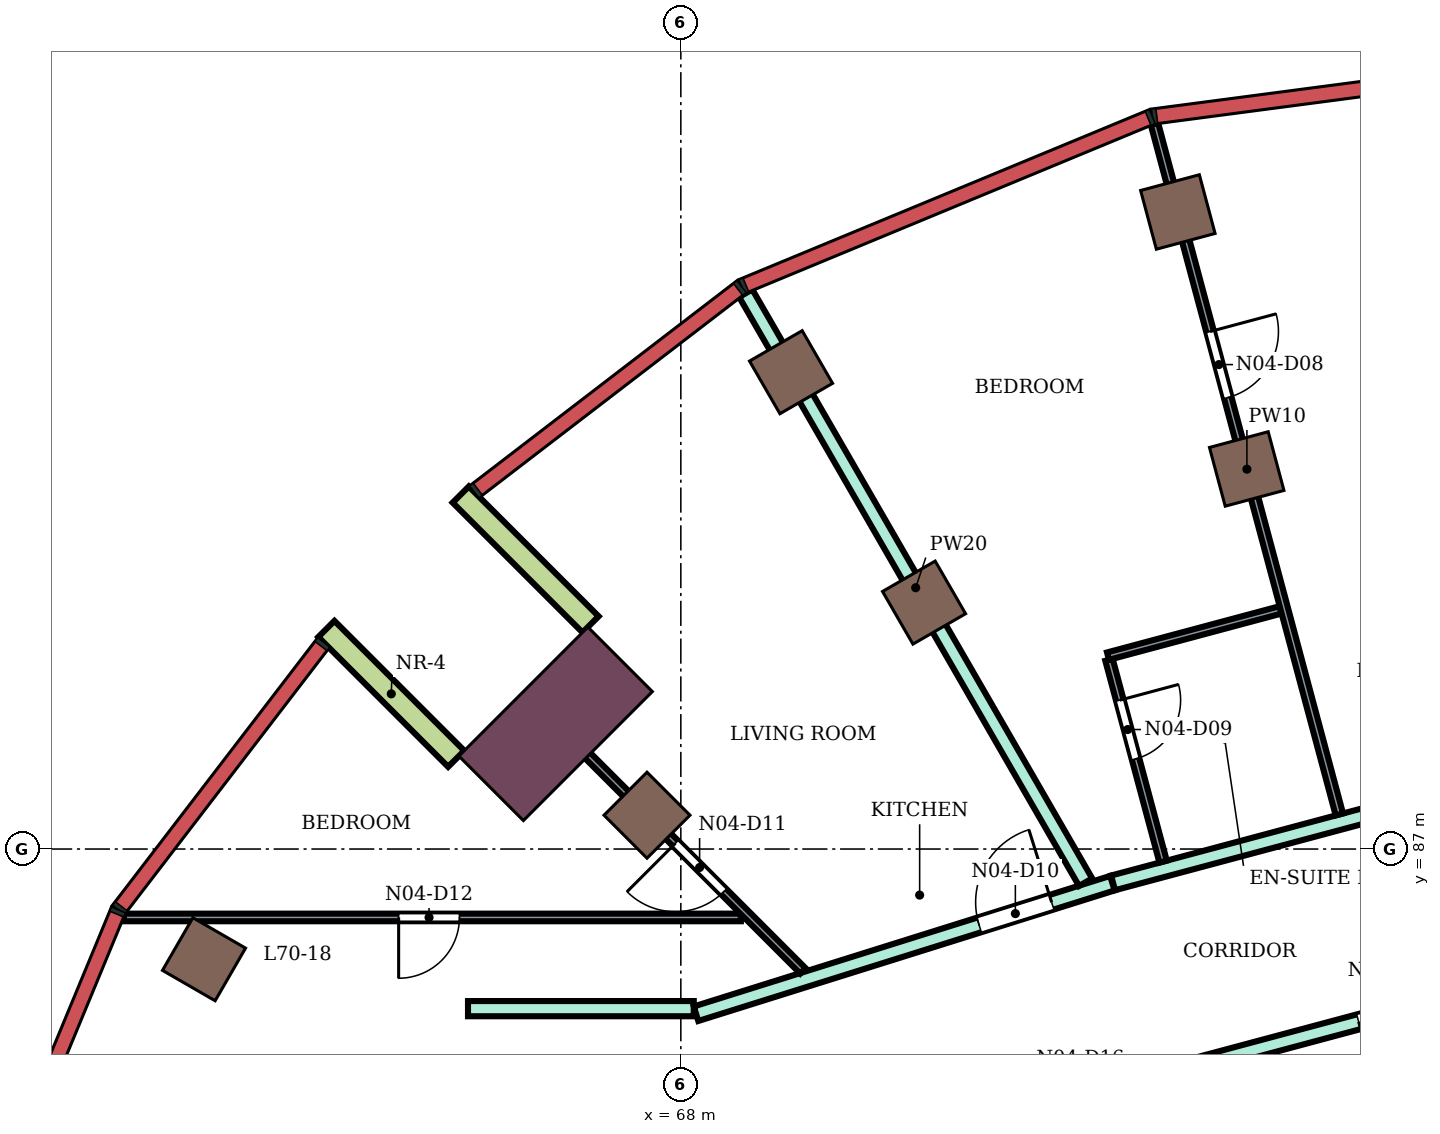
"""IFC4 building model, lengths in metres.
Left out: names, types, materials, properties, quantities, classifications, styles, units other than length and angle.
Written with IfcOpenShell. Run it as: python <this file> out.ifc"""

import sys

from ifc_helpers import new_model, si_unit, direction, frame, frame_2d, origin, origin_2d, place, context, subcontext, project, spatial, rectangle, extrude, element, fill, save


model = new_model("IFC4")
c1 = context("Model", 3, precision=1e-05, world=origin(), true_north=direction((0.0, 1.0)))
c2 = subcontext(c1, "Body", "Model", "MODEL_VIEW")
j1 = project(units=[si_unit("LENGTHUNIT", "METRE"), si_unit("PLANEANGLEUNIT", "RADIAN")], contexts=[c1])
p1 = place(None, origin())
s1 = spatial("IfcSite", under=j1, at=p1, CompositionType="ELEMENT")
p2 = place(p1, origin())
s2 = spatial("IfcBuilding", under=s1, at=p2, CompositionType="ELEMENT")
p3 = place(p2, frame((0.0, 0.0, 305.1)))
s3 = spatial("IfcBuildingStorey", under=s2, at=p3, CompositionType="ELEMENT", Elevation=305.1)
for number, where, z_axis, x_axis in (
    (1, (74.539, 95.381, 0.0), (0.0, 0.0, 1.0), (-0.259, 0.966, 0.0)),
    (2, (69.45, 93.273, 0.0), (0.0, 0.0, 1.0), (-0.5, 0.866, 0.0)),
    (3, (61.727, 85.55, 0.0), (0.0, 0.0, 1.0), (-0.866, 0.5, 0.0)),
    (4, (75.445, 92.0, 0.0), (0.0, 0.0, 1.0), (-0.259, 0.966, 0.0)),
    (5, (71.2, 90.242, 0.0), (0.0, 0.0, 1.0), (-0.5, 0.866, 0.0)),
    (6, (67.555, 87.445, 0.0), (0.0, 0.0, 1.0), (-0.707, 0.707, 0.0)),
):
    element("IfcColumn", number, at=place(p3, frame(where, z_axis=z_axis, x_axis=x_axis)), inside=s3, PredefinedType="COLUMN", context=c2, shape_type="SweptSolid", body=[
        extrude(rectangle(XDim=0.8, YDim=0.8, at=origin_2d()), origin(), (0.0, 0.0, 1.0), 4.2),
    ])
p4 = place(p3, frame((66.353, 88.647, 0.0), z_axis=(0.0, 0.0, 1.0), x_axis=(-0.707106781187, 0.707106781187, 0.0)))
e7 = element("IfcColumn", 7, at=p4, inside=s3, PredefinedType="COLUMN", context=c2, shape_type="SweptSolid", body=[
    extrude(rectangle(XDim=1.2, YDim=2.4, at=origin_2d()), origin(), (0.0, 0.0, 1.0), 4.2),
])
for number, where, z_axis, x_axis in (
    (8, (66.812, 89.955, 0.0), (0.0, 0.0, 1.0), (-0.707, 0.707, 0.0)),
    (9, (65.045, 88.188, 0.0), (0.0, 0.0, 1.0), (-0.707, 0.707, 0.0)),
):
    element("IfcWall", number, at=place(p3, frame(where, z_axis=z_axis, x_axis=x_axis)), inside=s3, PredefinedType="NOTDEFINED", context=c2, shape_type="SweptSolid", body=[
        extrude(rectangle(XDim=2.416, YDim=0.3, at=frame_2d((1.208, 0.0))), origin(), (0.0, 0.0, 1.0), 4.2),
    ])
p5 = place(p3, frame((65.2, 84.9, 0.0), z_axis=(0.0, 0.0, 1.0), x_axis=(1.0, 0.0, 0.0)))
e10 = element("IfcWall", 10, at=p5, inside=s3, PredefinedType="PARTITIONING", context=c2, shape_type="SweptSolid", body=[
    extrude(rectangle(XDim=2.97, YDim=0.2, at=frame_2d((1.485, 0.0))), origin(), (0.0, 0.0, 1.0), 3.75),
])
p6 = place(p3, frame((68.2, 84.833, 0.0), z_axis=(0.0, 0.0, 1.0), x_axis=(0.954191968402, 0.299195065863, 0.0)))
e11 = element("IfcWall", 11, at=p6, inside=s3, PredefinedType="PARTITIONING", context=c2, shape_type="SweptSolid", body=[
    extrude(rectangle(XDim=5.74, YDim=0.2, at=frame_2d((2.87, 0.0))), origin(), (0.0, 0.0, 1.0), 3.75),
])
p7 = place(p6, frame((3.903, 0.0, 0.0)))
e12 = element("IfcOpeningElement", 12, at=p7, cuts=e11, PredefinedType="OPENING", context=c2, shape_type="SweptSolid", body=[
    extrude(rectangle(XDim=1.0, YDim=2.1, at=frame_2d((0.5, 1.05))), frame((0.0, 0.11, 0.0), z_axis=(0.0, -1.0, 0.0), x_axis=(1.0, 0.0, 0.0)), (0.0, 0.0, 1.0), 0.22),
])
p8 = place(p3, frame((68.854, 94.312, 0.0), z_axis=(0.0, 0.0, 1.0), x_axis=(0.499901994742, -0.866081979753, 0.0)))
e13 = element("IfcWall", 13, at=p8, inside=s3, PredefinedType="PARTITIONING", context=c2, shape_type="SweptSolid", body=[
    extrude(rectangle(XDim=8.946, YDim=0.2, at=frame_2d((4.473, 0.0))), origin(), (0.0, 0.0, 1.0), 3.75),
])
p9 = place(p3, frame((73.687, 86.555, 0.0), z_axis=(0.0, 0.0, 1.0), x_axis=(0.966020868517, 0.258464081818, 0.0)))
e14 = element("IfcWall", 14, at=p9, inside=s3, PredefinedType="PARTITIONING", context=c2, shape_type="SweptSolid", body=[
    extrude(rectangle(XDim=6.446, YDim=0.2, at=frame_2d((3.223, 0.0))), origin(), (0.0, 0.0, 1.0), 3.75),
])
p10 = place(p9, frame((5.362, 0.0, 0.0)))
e15 = element("IfcOpeningElement", 15, at=p10, cuts=e14, PredefinedType="OPENING", context=c2, shape_type="SweptSolid", body=[
    extrude(rectangle(XDim=1.0, YDim=2.1, at=frame_2d((0.5, 1.05))), frame((0.0, 0.11, 0.0), z_axis=(0.0, -1.0, 0.0), x_axis=(1.0, 0.0, 0.0)), (0.0, 0.0, 1.0), 0.22),
])
p11 = place(p3, frame((74.413, 84.057, 0.0), z_axis=(0.0, 0.0, 1.0), x_axis=(0.965972135939, 0.258646153246, 0.0)))
e16 = element("IfcWall", 16, at=p11, inside=s3, PredefinedType="PARTITIONING", context=c2, shape_type="SweptSolid", body=[
    extrude(rectangle(XDim=5.654, YDim=0.2, at=frame_2d((2.827, 0.0))), origin(), (0.0, 0.0, 1.0), 3.75),
])
p12 = place(p11, frame((2.593, 0.0, 0.0)))
e17 = element("IfcOpeningElement", 17, at=p12, cuts=e16, PredefinedType="OPENING", context=c2, shape_type="SweptSolid", body=[
    extrude(rectangle(XDim=0.9, YDim=2.1, at=frame_2d((0.45, 1.05))), frame((0.0, 0.11, 0.0), z_axis=(0.0, -1.0, 0.0), x_axis=(1.0, 0.0, 0.0)), (0.0, 0.0, 1.0), 0.22),
])
p13 = place(p3, frame((60.673, 86.1, 0.0), z_axis=(0.0, 0.0, 1.0), x_axis=(1.0, 0.0, 0.0)))
e18 = element("IfcWall", 18, at=p13, inside=s3, PredefinedType="PARTITIONING", context=c2, shape_type="SweptSolid", body=[
    extrude(rectangle(XDim=8.117, YDim=0.1, at=frame_2d((4.059, 0.0))), origin(), (0.0, 0.0, 1.0), 3.75),
])
p14 = place(p13, frame((3.615, 0.0, 0.0)))
e19 = element("IfcOpeningElement", 19, at=p14, cuts=e18, PredefinedType="OPENING", context=c2, shape_type="SweptSolid", body=[
    extrude(rectangle(XDim=0.8, YDim=2.1, at=frame_2d((0.4, 1.05))), frame((0.0, 0.06, 0.0), z_axis=(0.0, -1.0, 0.0), x_axis=(1.0, 0.0, 0.0)), (0.0, 0.0, 1.0), 0.12),
])
p15 = place(p3, frame((66.073, 88.932, 0.0), z_axis=(0.0, 0.0, 1.0), x_axis=(0.70696025587, -0.707253276147, 0.0)))
e20 = element("IfcWall", 20, at=p15, inside=s3, PredefinedType="PARTITIONING", context=c2, shape_type="SweptSolid", body=[
    extrude(rectangle(XDim=4.999, YDim=0.1, at=frame_2d((2.5, 0.0))), origin(), (0.0, 0.0, 1.0), 3.75),
])
p16 = place(p15, frame((2.626, 0.0, 0.0)))
e21 = element("IfcOpeningElement", 21, at=p16, cuts=e20, PredefinedType="OPENING", context=c2, shape_type="SweptSolid", body=[
    extrude(rectangle(XDim=0.9, YDim=2.1, at=frame_2d((0.45, 1.05))), frame((0.0, 0.06, 0.0), z_axis=(0.0, -1.0, 0.0), x_axis=(1.0, 0.0, 0.0)), (0.0, 0.0, 1.0), 0.12),
])
p17 = place(p3, frame((73.633, 89.49, 0.0), z_axis=(0.0, 0.0, 1.0), x_axis=(0.259005329799, -0.965875892201, 0.0)))
e22 = element("IfcWall", 22, at=p17, inside=s3, PredefinedType="PARTITIONING", context=c2, shape_type="SweptSolid", body=[
    extrude(rectangle(XDim=2.75, YDim=0.1, at=frame_2d((1.375, 0.0))), origin(), (0.0, 0.0, 1.0), 3.75),
])
p18 = place(p17, frame((0.55, 0.0, 0.0)))
e23 = element("IfcOpeningElement", 23, at=p18, cuts=e22, PredefinedType="OPENING", context=c2, shape_type="SweptSolid", body=[
    extrude(rectangle(XDim=0.8, YDim=2.1, at=frame_2d((0.4, 1.05))), frame((0.0, 0.06, 0.0), z_axis=(0.0, -1.0, 0.0), x_axis=(1.0, 0.0, 0.0)), (0.0, 0.0, 1.0), 0.12),
])
p19 = place(p3, frame((73.62, 89.538, 0.0), z_axis=(0.0, 0.0, 1.0), x_axis=(0.965948051503, 0.258736085224, 0.0)))
e24 = element("IfcWall", 24, at=p19, inside=s3, PredefinedType="PARTITIONING", context=c2, shape_type="SweptSolid", body=[
    extrude(rectangle(XDim=2.35, YDim=0.1, at=frame_2d((1.175, 0.0))), origin(), (0.0, 0.0, 1.0), 3.75),
])
p20 = place(p3, frame((74.231, 96.539, 0.0), z_axis=(0.0, 0.0, 1.0), x_axis=(0.258666006211, -0.965966819943, 0.0)))
e25 = element("IfcWall", 25, at=p20, inside=s3, PredefinedType="PARTITIONING", context=c2, shape_type="SweptSolid", body=[
    extrude(rectangle(XDim=9.404, YDim=0.1, at=frame_2d((4.702, 0.0))), origin(), (0.0, 0.0, 1.0), 3.75),
])
p21 = place(p20, frame((2.827, 0.0, 0.0)))
e26 = element("IfcOpeningElement", 26, at=p21, cuts=e25, PredefinedType="OPENING", context=c2, shape_type="SweptSolid", body=[
    extrude(rectangle(XDim=0.9, YDim=2.1, at=frame_2d((0.45, 1.05))), frame((0.0, 0.06, 0.0), z_axis=(0.0, -1.0, 0.0), x_axis=(1.0, 0.0, 0.0)), (0.0, 0.0, 1.0), 0.12),
])
p22 = place(p21, origin())
e27 = element("IfcDoor", 27, at=p22, inside=s3, OperationType="SINGLE_SWING_LEFT", PredefinedType="DOOR", context=c2, shape_type="SweptSolid", body=[
    extrude(rectangle(XDim=0.9, YDim=2.1, at=frame_2d((0.45, 1.05))), frame((0.0, 0.025, 0.0), z_axis=(0.0, -1.0, 0.0), x_axis=(1.0, 0.0, 0.0)), (0.0, 0.0, 1.0), 0.05),
])
fill(e26, e27)
p23 = place(p18, origin())
e28 = element("IfcDoor", 28, at=p23, inside=s3, OperationType="SINGLE_SWING_LEFT", PredefinedType="DOOR", context=c2, shape_type="SweptSolid", body=[
    extrude(rectangle(XDim=0.8, YDim=2.1, at=frame_2d((0.4, 1.05))), frame((0.0, 0.025, 0.0), z_axis=(0.0, -1.0, 0.0), x_axis=(1.0, 0.0, 0.0)), (0.0, 0.0, 1.0), 0.05),
])
fill(e23, e28)
p24 = place(p7, origin())
e29 = element("IfcDoor", 29, at=p24, inside=s3, OperationType="SINGLE_SWING_RIGHT", PredefinedType="DOOR", context=c2, shape_type="SweptSolid", body=[
    extrude(rectangle(XDim=1.0, YDim=2.1, at=frame_2d((0.5, 1.05))), frame((0.0, 0.025, 0.0), z_axis=(0.0, -1.0, 0.0), x_axis=(1.0, 0.0, 0.0)), (0.0, 0.0, 1.0), 0.05),
])
fill(e12, e29)
p25 = place(p16, frame((0.9, 0.0, 0.0), z_axis=(0.0, 0.0, 1.0), x_axis=(-1.0, 0.0, 0.0)))
e30 = element("IfcDoor", 30, at=p25, inside=s3, OperationType="SINGLE_SWING_RIGHT", PredefinedType="DOOR", context=c2, shape_type="SweptSolid", body=[
    extrude(rectangle(XDim=0.9, YDim=2.1, at=frame_2d((0.45, 1.05))), frame((0.0, 0.025, 0.0), z_axis=(0.0, -1.0, 0.0), x_axis=(1.0, 0.0, 0.0)), (0.0, 0.0, 1.0), 0.05),
])
fill(e21, e30)
p26 = place(p14, frame((0.8, 0.0, 0.0), z_axis=(0.0, 0.0, 1.0), x_axis=(-1.0, 0.0, 0.0)))
e31 = element("IfcDoor", 31, at=p26, inside=s3, OperationType="SINGLE_SWING_RIGHT", PredefinedType="DOOR", context=c2, shape_type="SweptSolid", body=[
    extrude(rectangle(XDim=0.8, YDim=2.1, at=frame_2d((0.4, 1.05))), frame((0.0, 0.025, 0.0), z_axis=(0.0, -1.0, 0.0), x_axis=(1.0, 0.0, 0.0)), (0.0, 0.0, 1.0), 0.05),
])
fill(e19, e31)
p27 = place(p12, frame((0.9, 0.0, 0.0), z_axis=(0.0, 0.0, 1.0), x_axis=(-1.0, 0.0, 0.0)))
e32 = element("IfcDoor", 32, at=p27, inside=s3, OperationType="SINGLE_SWING_RIGHT", PredefinedType="DOOR", context=c2, shape_type="SweptSolid", body=[
    extrude(rectangle(XDim=0.9, YDim=2.1, at=frame_2d((0.45, 1.05))), frame((0.0, 0.025, 0.0), z_axis=(0.0, -1.0, 0.0), x_axis=(1.0, 0.0, 0.0)), (0.0, 0.0, 1.0), 0.05),
])
fill(e17, e32)
save(model, sys.argv[1])
